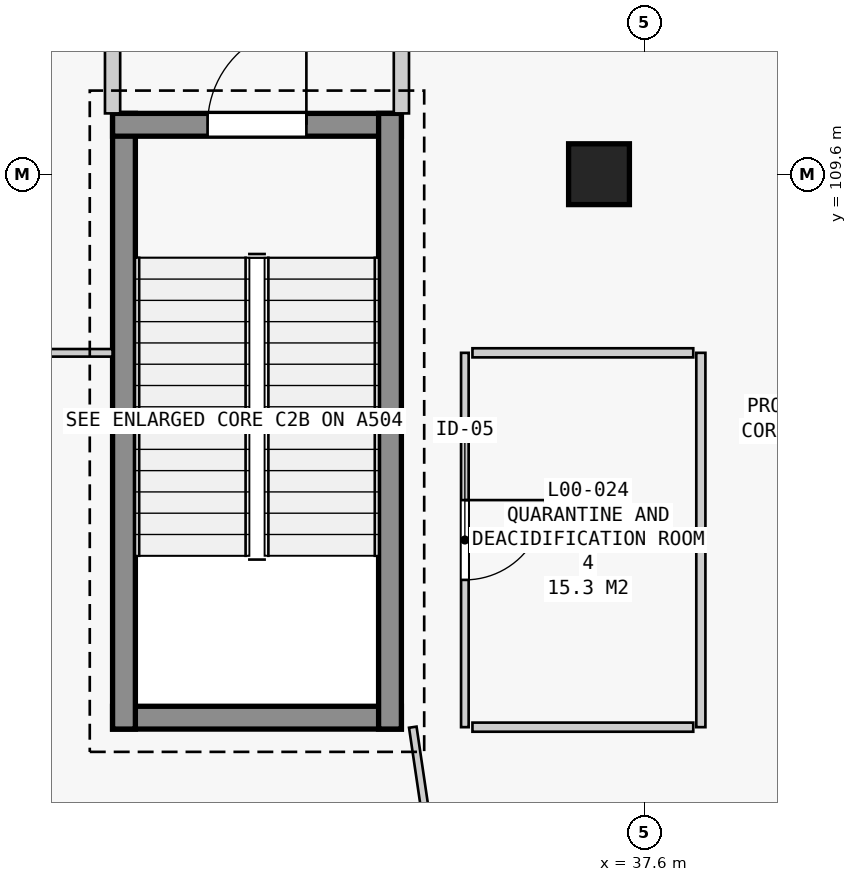
"""IFC4 building model, lengths in metres.
Left out: names, types, materials, properties, quantities, classifications, styles, units other than length and angle.
Written with IfcOpenShell. Run it as: python <this file> out.ifc"""

import sys

from ifc_helpers import new_model, si_unit, direction, frame, frame_2d, origin, origin_2d, place, context, subcontext, project, spatial, rectangle, extrude, element, fill, save


model = new_model("IFC4")
c1 = context("Model", 3, precision=1e-05, world=origin(), true_north=direction((0.0, 1.0)))
c2 = subcontext(c1, "Body", "Model", "MODEL_VIEW")
j1 = project(units=[si_unit("LENGTHUNIT", "METRE"), si_unit("PLANEANGLEUNIT", "RADIAN")], contexts=[c1])
p1 = place(None, origin())
s1 = spatial("IfcSite", under=j1, at=p1, CompositionType="ELEMENT")
p2 = place(p1, origin())
s2 = spatial("IfcBuilding", under=s1, at=p2, CompositionType="ELEMENT")
p3 = place(p2, origin())
s3 = spatial("IfcBuildingStorey", under=s2, at=p3, CompositionType="ELEMENT", Elevation=0.0)
p4 = place(p3, frame((37.0, 109.6, 0.0), z_axis=(0.0, 0.0, 1.0), x_axis=(1.0, 0.0, 0.0)))
e1 = element("IfcColumn", 1, at=p4, inside=s3, PredefinedType="COLUMN", context=c2, shape_type="SweptSolid", body=[
    extrude(rectangle(XDim=0.8, YDim=0.8, at=origin_2d()), origin(), (0.0, 0.0, 1.0), 5.4),
])
p5 = place(p3, frame((34.4, 102.45, 0.0), z_axis=(0.0, 0.0, 1.0), x_axis=(-1.0, 0.0, 0.0)))
e2 = element("IfcWall", 2, at=p5, inside=s3, PredefinedType="SHEAR", context=c2, shape_type="SweptSolid", body=[
    extrude(rectangle(XDim=3.8, YDim=0.3, at=frame_2d((1.9, 0.0))), origin(), (0.0, 0.0, 1.0), 5.08),
])
p6 = place(p3, frame((30.75, 102.3, 0.0), z_axis=(0.0, 0.0, 1.0), x_axis=(0.0, 1.0, 0.0)))
e3 = element("IfcWall", 3, at=p6, inside=s3, PredefinedType="SHEAR", context=c2, shape_type="SweptSolid", body=[
    extrude(rectangle(XDim=8.1, YDim=0.3, at=frame_2d((4.05, 0.0))), origin(), (0.0, 0.0, 1.0), 5.08),
])
p7 = place(p3, frame((30.6, 110.25, 0.0), z_axis=(0.0, 0.0, 1.0), x_axis=(1.0, 0.0, 0.0)))
e4 = element("IfcWall", 4, at=p7, inside=s3, PredefinedType="SHEAR", context=c2, shape_type="SweptSolid", body=[
    extrude(rectangle(XDim=3.8, YDim=0.3, at=frame_2d((1.9, 0.0))), origin(), (0.0, 0.0, 1.0), 5.08),
])
p8 = place(p7, frame((1.25, 0.0, 0.0)))
e5 = element("IfcOpeningElement", 5, at=p8, cuts=e4, PredefinedType="OPENING", context=c2, shape_type="SweptSolid", body=[
    extrude(rectangle(XDim=1.3, YDim=2.2, at=frame_2d((0.65, 1.1))), frame((0.0, 0.16, 0.0), z_axis=(0.0, -1.0, 0.0), x_axis=(1.0, 0.0, 0.0)), (0.0, 0.0, 1.0), 0.32),
])
p9 = place(p3, frame((34.25, 110.4, 0.0), z_axis=(0.0, 0.0, 1.0), x_axis=(0.0, -1.0, 0.0)))
e6 = element("IfcWall", 6, at=p9, inside=s3, PredefinedType="SHEAR", context=c2, shape_type="SweptSolid", body=[
    extrude(rectangle(XDim=8.1, YDim=0.3, at=frame_2d((4.05, 0.0))), origin(), (0.0, 0.0, 1.0), 5.08),
])
for number, where, z_axis, x_axis in (
    (7, (30.6, 110.4, 0.0), (0.0, 0.0, 1.0), (0.0, 1.0, 0.0)),
    (8, (34.4, 113.8, 0.0), (0.0, 0.0, 1.0), (0.0, -1.0, 0.0)),
):
    element("IfcWall", number, at=place(p3, frame(where, z_axis=z_axis, x_axis=x_axis)), inside=s3, PredefinedType="STANDARD", context=c2, shape_type="SweptSolid", body=[
        extrude(rectangle(XDim=3.4, YDim=0.2, at=frame_2d((1.7, 0.0))), origin(), (0.0, 0.0, 1.0), 5.08),
    ])
p10 = place(p3, frame((26.95, 107.25, 0.0), z_axis=(0.0, 0.0, 1.0), x_axis=(1.0, 0.0, 0.0)))
e9 = element("IfcWall", 9, at=p10, inside=s3, PredefinedType="PARTITIONING", context=c2, shape_type="SweptSolid", body=[
    extrude(rectangle(XDim=3.65, YDim=0.1, at=frame_2d((1.825, 0.0))), origin(), (0.0, 0.0, 1.0), 4.16),
])
p11 = place(p3, frame((35.235, 107.25, 0.0), z_axis=(0.0, 0.0, 1.0), x_axis=(0.0, -1.0, 0.0)))
e10 = element("IfcWall", 10, at=p11, inside=s3, PredefinedType="PARTITIONING", context=c2, shape_type="SweptSolid", body=[
    extrude(rectangle(XDim=4.925, YDim=0.1, at=frame_2d((2.462, 0.0))), origin(), (0.0, 0.0, 1.0), 5.08),
])
p12 = place(p11, frame((1.938, 0.0, 0.0)))
e11 = element("IfcOpeningElement", 11, at=p12, cuts=e10, PredefinedType="OPENING", context=c2, shape_type="SweptSolid", body=[
    extrude(rectangle(XDim=1.05, YDim=2.15, at=frame_2d((0.525, 1.075))), frame((0.0, 0.06, 0.0), z_axis=(0.0, -1.0, 0.0), x_axis=(1.0, 0.0, 0.0)), (0.0, 0.0, 1.0), 0.12),
])
p13 = place(p3, frame((34.55, 102.325, 0.0), z_axis=(0.0, 0.0, 1.0), x_axis=(0.14575418807, -0.989320836059, 0.0)))
e12 = element("IfcWall", 12, at=p13, inside=s3, PredefinedType="PARTITIONING", context=c2, shape_type="SweptSolid", body=[
    extrude(rectangle(XDim=4.7, YDim=0.1, at=frame_2d((2.35, 0.0))), origin(), (0.0, 0.0, 1.0), 4.31),
])
p14 = place(p3, frame((38.34, 107.25, 0.0), z_axis=(0.0, 0.0, 1.0), x_axis=(0.0, -1.0, 0.0)))
e13 = element("IfcWall", 13, at=p14, inside=s3, PredefinedType="PARTITIONING", context=c2, shape_type="SweptSolid", body=[
    extrude(rectangle(XDim=4.925, YDim=0.12, at=frame_2d((2.462, 0.0))), origin(), (0.0, 0.0, 1.0), 5.08),
])
for number, where, z_axis, x_axis in (
    (14, (38.24, 102.325, 0.0), (0.0, 0.0, 1.0), (-1.0, 0.0, 0.0)),
    (15, (35.335, 107.25, 0.0), (0.0, 0.0, 1.0), (1.0, 0.0, 0.0)),
):
    element("IfcWall", number, at=place(p3, frame(where, z_axis=z_axis, x_axis=x_axis)), inside=s3, PredefinedType="PARTITIONING", context=c2, shape_type="SweptSolid", body=[
        extrude(rectangle(XDim=2.905, YDim=0.12, at=frame_2d((1.453, 0.0))), origin(), (0.0, 0.0, 1.0), 4.36),
    ])
p15 = place(p8, origin())
e16 = element("IfcDoor", 16, at=p15, inside=s3, OperationType="SINGLE_SWING_RIGHT", PredefinedType="DOOR", context=c2, shape_type="SweptSolid", body=[
    extrude(rectangle(XDim=1.3, YDim=2.2, at=frame_2d((0.65, 1.1))), frame((0.0, 0.025, 0.0), z_axis=(0.0, -1.0, 0.0), x_axis=(1.0, 0.0, 0.0)), (0.0, 0.0, 1.0), 0.05),
])
fill(e5, e16)
p16 = place(p12, origin())
e17 = element("IfcDoor", 17, at=p16, inside=s3, OperationType="SINGLE_SWING_LEFT", PredefinedType="DOOR", context=c2, shape_type="SweptSolid", body=[
    extrude(rectangle(XDim=1.05, YDim=2.15, at=frame_2d((0.525, 1.075))), frame((0.0, 0.025, 0.0), z_axis=(0.0, -1.0, 0.0), x_axis=(1.0, 0.0, 0.0)), (0.0, 0.0, 1.0), 0.05),
])
fill(e11, e17)
save(model, sys.argv[1])
